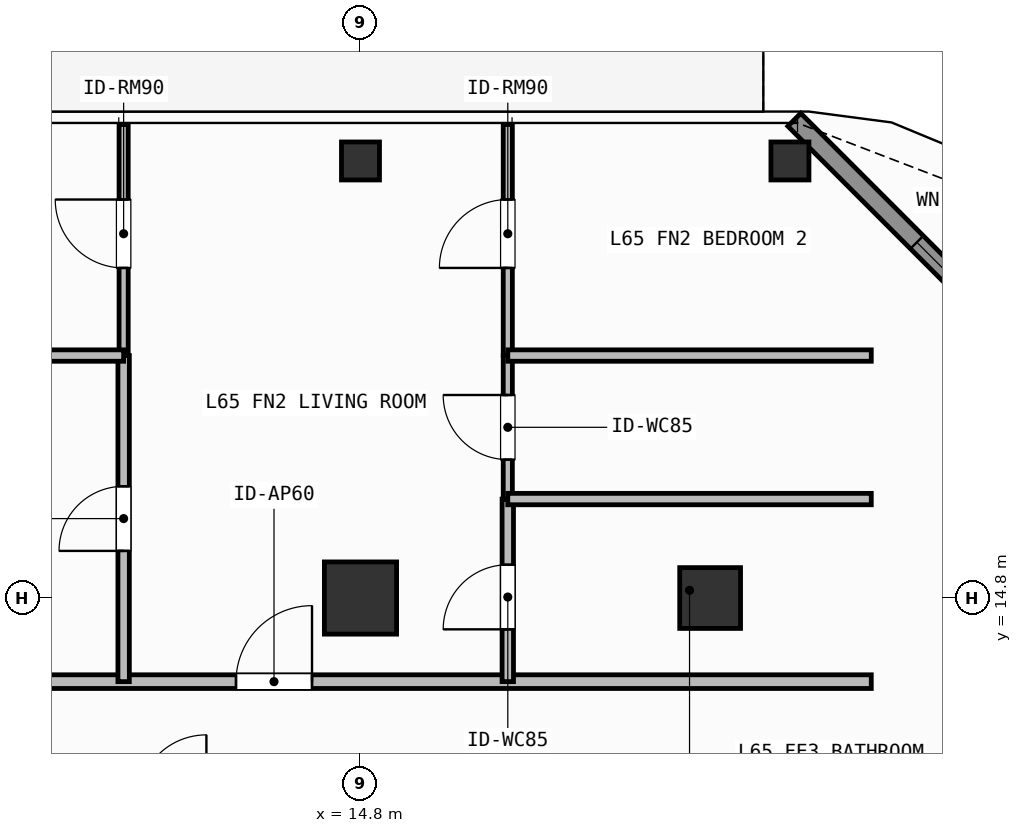
"""IFC4 building model, lengths in metres.
Left out: names, types, materials, properties, quantities, classifications, styles, units other than length and angle.
Written with IfcOpenShell. Run it as: python <this file> out.ifc"""

import sys

from ifc_helpers import new_model, si_unit, direction, frame, frame_2d, origin, origin_2d, place, context, subcontext, project, spatial, rectangle, hollow_rectangle, extrude, element, fill, save


model = new_model("IFC4")
c1 = context("Model", 3, precision=1e-05, world=origin(), true_north=direction((0.0, 1.0)))
c2 = subcontext(c1, "Body", "Model", "MODEL_VIEW")
j1 = project(units=[si_unit("LENGTHUNIT", "METRE"), si_unit("PLANEANGLEUNIT", "RADIAN")], contexts=[c1])
p1 = place(None, origin())
s1 = spatial("IfcSite", under=j1, at=p1, CompositionType="ELEMENT")
p2 = place(p1, origin())
s2 = spatial("IfcBuilding", under=s1, at=p2, CompositionType="ELEMENT")
p3 = place(p2, frame((0.0, 0.0, 266.4)))
s3 = spatial("IfcBuildingStorey", under=s2, at=p3, CompositionType="ELEMENT", Elevation=266.4)
p4 = place(p3, frame((14.8, 14.8, 0.0), z_axis=(0.0, 0.0, 1.0), x_axis=(1.0, 0.0, 0.0)))
e1 = element("IfcColumn", 1, at=p4, inside=s3, PredefinedType="COLUMN", context=c2, shape_type="SweptSolid", body=[
    extrude(rectangle(XDim=0.95, YDim=0.95, at=origin_2d()), origin(), (0.0, 0.0, 1.0), 3.9),
])
p5 = place(p3, frame((19.4, 14.8, 0.0), z_axis=(0.0, 0.0, 1.0), x_axis=(1.0, 0.0, 0.0)))
e2 = element("IfcColumn", 2, at=p5, inside=s3, PredefinedType="COLUMN", context=c2, shape_type="SweptSolid", body=[
    extrude(hollow_rectangle(XDim=0.8, YDim=0.8, WallThickness=0.036, at=origin_2d()), origin(), (0.0, 0.0, 1.0), 3.9),
])
for number, where, z_axis, x_axis in (
    (3, (20.45, 20.55, 0.0), (0.0, 0.0, 1.0), (1.0, 0.0, 0.0)),
    (4, (14.8, 20.55, 0.0), (0.0, 0.0, 1.0), (1.0, 0.0, 0.0)),
):
    element("IfcColumn", number, at=place(p3, frame(where, z_axis=z_axis, x_axis=x_axis)), inside=s3, PredefinedType="COLUMN", context=c2, shape_type="SweptSolid", body=[
        extrude(hollow_rectangle(XDim=0.5, YDim=0.5, WallThickness=0.025, at=origin_2d()), origin(), (0.0, 0.0, 1.0), 3.9),
    ])
p6 = place(p3, frame((20.508, 21.092, 0.0), z_axis=(0.0, 0.0, 1.0), x_axis=(0.707126925818, -0.707086635981, 0.0)))
e5 = element("IfcWall", 5, at=p6, inside=s3, PredefinedType="SOLIDWALL", context=c2, shape_type="SweptSolid", body=[
    extrude(rectangle(XDim=6.06, YDim=0.24, at=frame_2d((3.03, 0.0))), origin(), (0.0, 0.0, 1.0), 3.68),
])
p7 = place(p6, frame((2.28, 0.0, 0.8)))
e6 = element("IfcOpeningElement", 6, at=p7, cuts=e5, PredefinedType="OPENING", context=c2, shape_type="SweptSolid", body=[
    extrude(rectangle(XDim=1.5, YDim=1.85, at=frame_2d((0.75, 0.925))), frame((0.0, 0.13, 0.0), z_axis=(0.0, -1.0, 0.0), x_axis=(1.0, 0.0, 0.0)), (0.0, 0.0, 1.0), 0.26),
])
p8 = place(p3, frame((7.424, 13.7, 0.0), z_axis=(0.0, 0.0, 1.0), x_axis=(1.0, 0.0, 0.0)))
e7 = element("IfcWall", 7, at=p8, inside=s3, PredefinedType="PARTITIONING", context=c2, shape_type="SweptSolid", body=[
    extrude(rectangle(XDim=14.096, YDim=0.18, at=frame_2d((7.048, 0.0))), origin(), (0.0, 0.0, 1.0), 3.68),
])
p9 = place(p8, frame((5.738, 0.0, 0.0)))
e8 = element("IfcOpeningElement", 8, at=p9, cuts=e7, PredefinedType="OPENING", context=c2, shape_type="SweptSolid", body=[
    extrude(rectangle(XDim=1.0, YDim=2.2, at=frame_2d((0.5, 1.1))), frame((0.0, 0.1, 0.0), z_axis=(0.0, -1.0, 0.0), x_axis=(1.0, 0.0, 0.0)), (0.0, 0.0, 1.0), 0.2),
])
p10 = place(p3, frame((11.684, 13.7, 0.0), z_axis=(0.0, 0.0, 1.0), x_axis=(0.0, 1.0, 0.0)))
e9 = element("IfcWall", 9, at=p10, inside=s3, PredefinedType="PARTITIONING", context=c2, shape_type="SweptSolid", body=[
    extrude(rectangle(XDim=4.29, YDim=0.15, at=frame_2d((2.145, 0.0))), origin(), (0.0, 0.0, 1.0), 3.68),
])
p11 = place(p10, frame((1.72, 0.0, 0.0)))
e10 = element("IfcOpeningElement", 10, at=p11, cuts=e9, PredefinedType="OPENING", context=c2, shape_type="SweptSolid", body=[
    extrude(rectangle(XDim=0.85, YDim=2.1, at=frame_2d((0.425, 1.05))), frame((0.0, 0.085, 0.0), z_axis=(0.0, -1.0, 0.0), x_axis=(1.0, 0.0, 0.0)), (0.0, 0.0, 1.0), 0.17),
])
p12 = place(p3, frame((11.684, 17.99, 0.0), z_axis=(0.0, 0.0, 1.0), x_axis=(0.0, 1.0, 0.0)))
e11 = element("IfcWall", 11, at=p12, inside=s3, PredefinedType="PARTITIONING", context=c2, shape_type="SweptSolid", body=[
    extrude(rectangle(XDim=3.04, YDim=0.12, at=frame_2d((1.52, 0.0))), origin(), (0.0, 0.0, 1.0), 3.68),
])
p13 = place(p12, frame((1.153, 0.0, 0.0)))
e12 = element("IfcOpeningElement", 12, at=p13, cuts=e11, PredefinedType="OPENING", context=c2, shape_type="SweptSolid", body=[
    extrude(rectangle(XDim=0.9, YDim=2.1, at=frame_2d((0.45, 1.05))), frame((0.0, 0.07, 0.0), z_axis=(0.0, -1.0, 0.0), x_axis=(1.0, 0.0, 0.0)), (0.0, 0.0, 1.0), 0.14),
])
p14 = place(p3, frame((16.738, 13.7, 0.0), z_axis=(0.0, 0.0, 1.0), x_axis=(0.0, 1.0, 0.0)))
e13 = element("IfcWall", 13, at=p14, inside=s3, PredefinedType="PARTITIONING", context=c2, shape_type="SweptSolid", body=[
    extrude(rectangle(XDim=2.402, YDim=0.15, at=frame_2d((1.201, 0.0))), origin(), (0.0, 0.0, 1.0), 3.68),
])
p15 = place(p14, frame((0.688, 0.0, 0.0)))
e14 = element("IfcOpeningElement", 14, at=p15, cuts=e13, PredefinedType="OPENING", context=c2, shape_type="SweptSolid", body=[
    extrude(rectangle(XDim=0.85, YDim=2.1, at=frame_2d((0.425, 1.05))), frame((0.0, 0.085, 0.0), z_axis=(0.0, -1.0, 0.0), x_axis=(1.0, 0.0, 0.0)), (0.0, 0.0, 1.0), 0.17),
])
p16 = place(p3, frame((16.738, 16.102, 0.0), z_axis=(0.0, 0.0, 1.0), x_axis=(0.0, 1.0, 0.0)))
e15 = element("IfcWall", 15, at=p16, inside=s3, PredefinedType="PARTITIONING", context=c2, shape_type="SweptSolid", body=[
    extrude(rectangle(XDim=1.888, YDim=0.12, at=frame_2d((0.944, 0.0))), origin(), (0.0, 0.0, 1.0), 3.68),
])
p17 = place(p16, frame((0.519, 0.0, 0.0)))
e16 = element("IfcOpeningElement", 16, at=p17, cuts=e15, PredefinedType="OPENING", context=c2, shape_type="SweptSolid", body=[
    extrude(rectangle(XDim=0.85, YDim=2.1, at=frame_2d((0.425, 1.05))), frame((0.0, 0.07, 0.0), z_axis=(0.0, -1.0, 0.0), x_axis=(1.0, 0.0, 0.0)), (0.0, 0.0, 1.0), 0.14),
])
p18 = place(p3, frame((16.738, 17.99, 0.0), z_axis=(0.0, 0.0, 1.0), x_axis=(0.0, 1.0, 0.0)))
e17 = element("IfcWall", 17, at=p18, inside=s3, PredefinedType="PARTITIONING", context=c2, shape_type="SweptSolid", body=[
    extrude(rectangle(XDim=3.04, YDim=0.12, at=frame_2d((1.52, 0.0))), origin(), (0.0, 0.0, 1.0), 3.68),
])
p19 = place(p18, frame((1.153, 0.0, 0.0)))
e18 = element("IfcOpeningElement", 18, at=p19, cuts=e17, PredefinedType="OPENING", context=c2, shape_type="SweptSolid", body=[
    extrude(rectangle(XDim=0.9, YDim=2.1, at=frame_2d((0.45, 1.05))), frame((0.0, 0.07, 0.0), z_axis=(0.0, -1.0, 0.0), x_axis=(1.0, 0.0, 0.0)), (0.0, 0.0, 1.0), 0.14),
])
p20 = place(p3, frame((7.424, 17.99, 0.0), z_axis=(0.0, 0.0, 1.0), x_axis=(1.0, 0.0, 0.0)))
e19 = element("IfcWall", 19, at=p20, inside=s3, PredefinedType="PARTITIONING", context=c2, shape_type="SweptSolid", body=[
    extrude(rectangle(XDim=4.26, YDim=0.15, at=frame_2d((2.13, 0.0))), origin(), (0.0, 0.0, 1.0), 3.68),
])
for number, where, z_axis, x_axis in (
    (20, (16.738, 16.102, 0.0), (0.0, 0.0, 1.0), (1.0, 0.0, 0.0)),
    (21, (16.738, 17.99, 0.0), (0.0, 0.0, 1.0), (1.0, 0.0, 0.0)),
):
    element("IfcWall", number, at=place(p3, frame(where, z_axis=z_axis, x_axis=x_axis)), inside=s3, PredefinedType="PARTITIONING", context=c2, shape_type="SweptSolid", body=[
        extrude(rectangle(XDim=4.782, YDim=0.15, at=frame_2d((2.391, 0.0))), origin(), (0.0, 0.0, 1.0), 3.68),
    ])
p21 = place(p7, origin())
e22 = element("IfcWindow", 22, at=p21, inside=s3, PartitioningType="SINGLE_PANEL", PredefinedType="WINDOW", context=c2, shape_type="SweptSolid", body=[
    extrude(rectangle(XDim=1.5, YDim=1.85, at=frame_2d((0.75, 0.925))), frame((0.0, 0.03, 0.0), z_axis=(0.0, -1.0, 0.0), x_axis=(1.0, 0.0, 0.0)), (0.0, 0.0, 1.0), 0.06),
])
fill(e6, e22)
p22 = place(p9, origin())
e23 = element("IfcDoor", 23, at=p22, inside=s3, OperationType="SINGLE_SWING_RIGHT", PredefinedType="DOOR", context=c2, shape_type="SweptSolid", body=[
    extrude(rectangle(XDim=1.0, YDim=2.2, at=frame_2d((0.5, 1.1))), frame((0.0, 0.025, 0.0), z_axis=(0.0, -1.0, 0.0), x_axis=(1.0, 0.0, 0.0)), (0.0, 0.0, 1.0), 0.05),
])
fill(e8, e23)
p23 = place(p11, origin())
e24 = element("IfcDoor", 24, at=p23, inside=s3, OperationType="SINGLE_SWING_LEFT", PredefinedType="DOOR", context=c2, shape_type="SweptSolid", body=[
    extrude(rectangle(XDim=0.85, YDim=2.1, at=frame_2d((0.425, 1.05))), frame((0.0, 0.025, 0.0), z_axis=(0.0, -1.0, 0.0), x_axis=(1.0, 0.0, 0.0)), (0.0, 0.0, 1.0), 0.05),
])
fill(e10, e24)
p24 = place(p13, origin())
e25 = element("IfcDoor", 25, at=p24, inside=s3, OperationType="SINGLE_SWING_RIGHT", PredefinedType="DOOR", context=c2, shape_type="SweptSolid", body=[
    extrude(rectangle(XDim=0.9, YDim=2.1, at=frame_2d((0.45, 1.05))), frame((0.0, 0.025, 0.0), z_axis=(0.0, -1.0, 0.0), x_axis=(1.0, 0.0, 0.0)), (0.0, 0.0, 1.0), 0.05),
])
fill(e12, e25)
p25 = place(p15, origin())
e26 = element("IfcDoor", 26, at=p25, inside=s3, OperationType="SINGLE_SWING_LEFT", PredefinedType="DOOR", context=c2, shape_type="SweptSolid", body=[
    extrude(rectangle(XDim=0.85, YDim=2.1, at=frame_2d((0.425, 1.05))), frame((0.0, 0.025, 0.0), z_axis=(0.0, -1.0, 0.0), x_axis=(1.0, 0.0, 0.0)), (0.0, 0.0, 1.0), 0.05),
])
fill(e14, e26)
p26 = place(p17, origin())
e27 = element("IfcDoor", 27, at=p26, inside=s3, OperationType="SINGLE_SWING_RIGHT", PredefinedType="DOOR", context=c2, shape_type="SweptSolid", body=[
    extrude(rectangle(XDim=0.85, YDim=2.1, at=frame_2d((0.425, 1.05))), frame((0.0, 0.025, 0.0), z_axis=(0.0, -1.0, 0.0), x_axis=(1.0, 0.0, 0.0)), (0.0, 0.0, 1.0), 0.05),
])
fill(e16, e27)
p27 = place(p19, origin())
e28 = element("IfcDoor", 28, at=p27, inside=s3, OperationType="SINGLE_SWING_LEFT", PredefinedType="DOOR", context=c2, shape_type="SweptSolid", body=[
    extrude(rectangle(XDim=0.9, YDim=2.1, at=frame_2d((0.45, 1.05))), frame((0.0, 0.025, 0.0), z_axis=(0.0, -1.0, 0.0), x_axis=(1.0, 0.0, 0.0)), (0.0, 0.0, 1.0), 0.05),
])
fill(e18, e28)
save(model, sys.argv[1])
